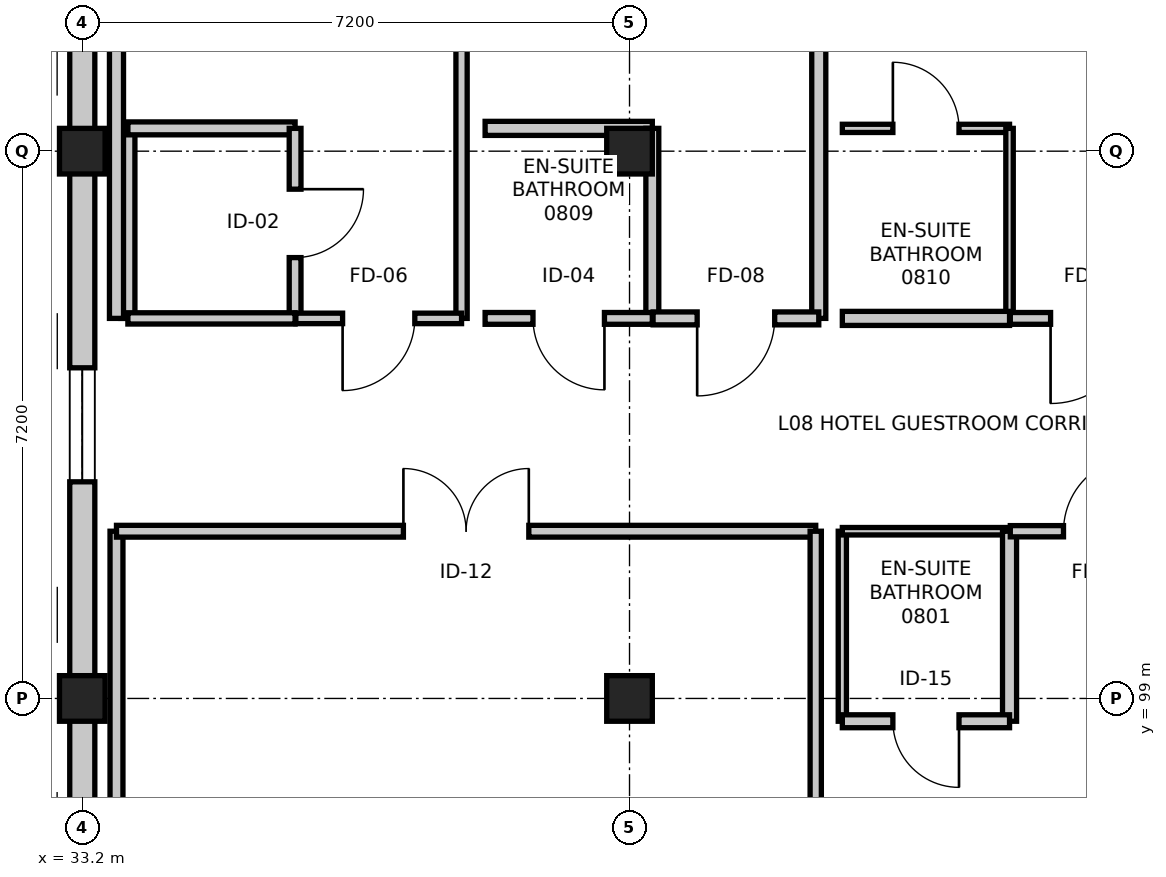
"""IFC4 building model, lengths in metres.
Left out: names, types, materials, properties, quantities, classifications, styles, units other than length and angle.
Written with IfcOpenShell. Run it as: python <this file> out.ifc"""

import sys

from ifc_helpers import new_model, si_unit, direction, frame, frame_2d, origin, origin_2d, place, context, subcontext, project, spatial, rectangle, extrude, element, fill, save


model = new_model("IFC4")
c1 = context("Model", 3, precision=1e-05, world=origin(), true_north=direction((0.0, 1.0)))
c2 = subcontext(c1, "Body", "Model", "MODEL_VIEW")
j1 = project(units=[si_unit("LENGTHUNIT", "METRE"), si_unit("PLANEANGLEUNIT", "RADIAN")], contexts=[c1])
p1 = place(None, origin())
s1 = spatial("IfcSite", under=j1, at=p1, CompositionType="ELEMENT")
p2 = place(p1, origin())
s2 = spatial("IfcBuilding", under=s1, at=p2, CompositionType="ELEMENT")
p3 = place(p2, frame((0.0, 0.0, 33.6)))
s3 = spatial("IfcBuildingStorey", under=s2, at=p3, CompositionType="ELEMENT", Elevation=33.6)
for number, where, z_axis, x_axis in (
    (1, (33.2, 99.0, 0.0), (0.0, 0.0, 1.0), (1.0, 0.0, 0.0)),
    (2, (33.2, 106.2, 0.0), (0.0, 0.0, 1.0), (1.0, 0.0, 0.0)),
    (3, (40.4, 99.0, 0.0), (0.0, 0.0, 1.0), (1.0, 0.0, 0.0)),
    (4, (40.4, 106.2, 0.0), (0.0, 0.0, 1.0), (1.0, 0.0, 0.0)),
):
    element("IfcColumn", number, at=place(p3, frame(where, z_axis=z_axis, x_axis=x_axis)), inside=s3, PredefinedType="COLUMN", context=c2, shape_type="SweptSolid", body=[
        extrude(rectangle(XDim=0.6, YDim=0.6, at=origin_2d()), origin(), (0.0, 0.0, 1.0), 3.6),
    ])
p4 = place(p3, frame((33.2, 91.8, 0.0), z_axis=(0.0, 0.0, 1.0), x_axis=(0.0, 1.0, 0.0)))
e5 = element("IfcWall", 5, at=p4, inside=s3, PredefinedType="STANDARD", context=c2, shape_type="SweptSolid", body=[
    extrude(rectangle(XDim=7.2, YDim=0.33, at=frame_2d((3.6, 0.0))), origin(), (0.0, 0.0, 1.0), 2.695),
])
p5 = place(p4, frame((2.85, 0.0, 0.75)))
e6 = element("IfcOpeningElement", 6, at=p5, cuts=e5, PredefinedType="OPENING", context=c2, shape_type="SweptSolid", body=[
    extrude(rectangle(XDim=1.5, YDim=1.5, at=frame_2d((0.75, 0.75))), frame((0.0, 0.175, 0.0), z_axis=(0.0, -1.0, 0.0), x_axis=(1.0, 0.0, 0.0)), (0.0, 0.0, 1.0), 0.35),
])
p6 = place(p3, frame((33.2, 99.0, 0.0), z_axis=(0.0, 0.0, 1.0), x_axis=(0.0, 1.0, 0.0)))
e7 = element("IfcWall", 7, at=p6, inside=s3, PredefinedType="STANDARD", context=c2, shape_type="SweptSolid", body=[
    extrude(rectangle(XDim=7.2, YDim=0.33, at=frame_2d((3.6, 0.0))), origin(), (0.0, 0.0, 1.0), 2.695),
])
p7 = place(p6, frame((2.85, 0.0, 0.75)))
e8 = element("IfcOpeningElement", 8, at=p7, cuts=e7, PredefinedType="OPENING", context=c2, shape_type="SweptSolid", body=[
    extrude(rectangle(XDim=1.5, YDim=1.5, at=frame_2d((0.75, 0.75))), frame((0.0, 0.175, 0.0), z_axis=(0.0, -1.0, 0.0), x_axis=(1.0, 0.0, 0.0)), (0.0, 0.0, 1.0), 0.35),
])
p8 = place(p3, frame((33.2, 106.2, 0.0), z_axis=(0.0, 0.0, 1.0), x_axis=(0.0, 1.0, 0.0)))
e9 = element("IfcWall", 9, at=p8, inside=s3, PredefinedType="STANDARD", context=c2, shape_type="SweptSolid", body=[
    extrude(rectangle(XDim=7.2, YDim=0.33, at=frame_2d((3.6, 0.0))), origin(), (0.0, 0.0, 1.0), 2.695),
])
p9 = place(p8, frame((2.85, 0.0, 0.75)))
e10 = element("IfcOpeningElement", 10, at=p9, cuts=e9, PredefinedType="OPENING", context=c2, shape_type="SweptSolid", body=[
    extrude(rectangle(XDim=1.5, YDim=1.5, at=frame_2d((0.75, 0.75))), frame((0.0, 0.175, 0.0), z_axis=(0.0, -1.0, 0.0), x_axis=(1.0, 0.0, 0.0)), (0.0, 0.0, 1.0), 0.35),
])
p10 = place(p3, frame((33.65, 91.96, 0.0), z_axis=(0.0, 0.0, 1.0), x_axis=(0.0, 1.0, 0.0)))
e11 = element("IfcWall", 11, at=p10, inside=s3, PredefinedType="PARTITIONING", context=c2, shape_type="SweptSolid", body=[
    extrude(rectangle(XDim=9.24, YDim=0.17, at=frame_2d((4.62, 0.0))), origin(), (0.0, 0.0, 1.0), 2.745),
])
p11 = place(p3, frame((33.65, 101.2, 0.0), z_axis=(0.0, 0.0, 1.0), x_axis=(1.0, 0.0, 0.0)))
e12 = element("IfcWall", 12, at=p11, inside=s3, PredefinedType="PARTITIONING", context=c2, shape_type="SweptSolid", body=[
    extrude(rectangle(XDim=9.2, YDim=0.155, at=frame_2d((4.6, 0.0))), origin(), (0.0, 0.0, 1.0), 2.695),
])
p12 = place(p11, frame((3.775, 0.0, 0.0)))
e13 = element("IfcOpeningElement", 13, at=p12, cuts=e12, PredefinedType="OPENING", context=c2, shape_type="SweptSolid", body=[
    extrude(rectangle(XDim=1.65, YDim=2.25, at=frame_2d((0.825, 1.125))), frame((0.0, 0.087, 0.0), z_axis=(0.0, -1.0, 0.0), x_axis=(1.0, 0.0, 0.0)), (0.0, 0.0, 1.0), 0.175),
])
p13 = place(p3, frame((42.85, 101.2, 0.0), z_axis=(0.0, 0.0, 1.0), x_axis=(0.0, -1.0, 0.0)))
e14 = element("IfcWall", 14, at=p13, inside=s3, PredefinedType="PARTITIONING", context=c2, shape_type="SweptSolid", body=[
    extrude(rectangle(XDim=9.24, YDim=0.148, at=frame_2d((4.62, 0.0))), origin(), (0.0, 0.0, 1.0), 2.745),
])
p14 = place(p3, frame((43.2, 98.7, 0.0), z_axis=(0.0, 0.0, 1.0), x_axis=(0.0, 1.0, 0.0)))
e15 = element("IfcWall", 15, at=p14, inside=s3, PredefinedType="PARTITIONING", context=c2, shape_type="SweptSolid", body=[
    extrude(rectangle(XDim=2.5, YDim=0.108, at=frame_2d((1.25, 0.0))), origin(), (0.0, 0.0, 1.0), 2.745),
])
p15 = place(p3, frame((43.2, 101.2, 0.0), z_axis=(0.0, 0.0, 1.0), x_axis=(1.0, 0.0, 0.0)))
e16 = element("IfcWall", 16, at=p15, inside=s3, PredefinedType="PARTITIONING", context=c2, shape_type="SweptSolid", body=[
    extrude(rectangle(XDim=2.2, YDim=0.098, at=frame_2d((1.1, 0.0))), origin(), (0.0, 0.0, 1.0), 3.36),
])
p16 = place(p3, frame((45.4, 101.2, 0.0), z_axis=(0.0, 0.0, 1.0), x_axis=(0.0, -1.0, 0.0)))
e17 = element("IfcWall", 17, at=p16, inside=s3, PredefinedType="PARTITIONING", context=c2, shape_type="SweptSolid", body=[
    extrude(rectangle(XDim=2.5, YDim=0.185, at=frame_2d((1.25, 0.0))), origin(), (0.0, 0.0, 1.0), 2.745),
])
p17 = place(p3, frame((45.4, 98.7, 0.0), z_axis=(0.0, 0.0, 1.0), x_axis=(-1.0, 0.0, 0.0)))
e18 = element("IfcWall", 18, at=p17, inside=s3, PredefinedType="PARTITIONING", context=c2, shape_type="SweptSolid", body=[
    extrude(rectangle(XDim=2.2, YDim=0.17, at=frame_2d((1.1, 0.0))), origin(), (0.0, 0.0, 1.0), 2.745),
])
p18 = place(p17, frame((0.665, 0.0, 0.0)))
e19 = element("IfcOpeningElement", 19, at=p18, cuts=e18, PredefinedType="OPENING", context=c2, shape_type="SweptSolid", body=[
    extrude(rectangle(XDim=0.87, YDim=2.07, at=frame_2d((0.435, 1.035))), frame((0.0, 0.095, 0.0), z_axis=(0.0, -1.0, 0.0), x_axis=(1.0, 0.0, 0.0)), (0.0, 0.0, 1.0), 0.19),
])
p19 = place(p3, frame((45.41, 101.2, 0.0), z_axis=(0.0, 0.0, 1.0), x_axis=(1.0, 0.0, 0.0)))
e20 = element("IfcWall", 20, at=p19, inside=s3, PredefinedType="PARTITIONING", context=c2, shape_type="SweptSolid", body=[
    extrude(rectangle(XDim=2.38, YDim=0.148, at=frame_2d((1.19, 0.0))), origin(), (0.0, 0.0, 1.0), 2.695),
])
p20 = place(p19, frame((0.7, 0.0, 0.0)))
e21 = element("IfcOpeningElement", 21, at=p20, cuts=e20, PredefinedType="OPENING", context=c2, shape_type="SweptSolid", body=[
    extrude(rectangle(XDim=0.98, YDim=2.15, at=frame_2d((0.49, 1.075))), frame((0.0, 0.084, 0.0), z_axis=(0.0, -1.0, 0.0), x_axis=(1.0, 0.0, 0.0)), (0.0, 0.0, 1.0), 0.168),
])
p21 = place(p3, frame((33.8, 104.0, 0.0), z_axis=(0.0, 0.0, 1.0), x_axis=(0.0, 1.0, 0.0)))
e22 = element("IfcWall", 22, at=p21, inside=s3, PredefinedType="PARTITIONING", context=c2, shape_type="SweptSolid", body=[
    extrude(rectangle(XDim=2.5, YDim=0.185, at=frame_2d((1.25, 0.0))), origin(), (0.0, 0.0, 1.0), 2.745),
])
p22 = place(p3, frame((33.8, 106.5, 0.0), z_axis=(0.0, 0.0, 1.0), x_axis=(1.0, 0.0, 0.0)))
e23 = element("IfcWall", 23, at=p22, inside=s3, PredefinedType="PARTITIONING", context=c2, shape_type="SweptSolid", body=[
    extrude(rectangle(XDim=2.2, YDim=0.17, at=frame_2d((1.1, 0.0))), origin(), (0.0, 0.0, 1.0), 2.745),
])
p23 = place(p3, frame((36.0, 106.5, 0.0), z_axis=(0.0, 0.0, 1.0), x_axis=(0.0, -1.0, 0.0)))
e24 = element("IfcWall", 24, at=p23, inside=s3, PredefinedType="PARTITIONING", context=c2, shape_type="SweptSolid", body=[
    extrude(rectangle(XDim=2.5, YDim=0.155, at=frame_2d((1.25, 0.0))), origin(), (0.0, 0.0, 1.0), 2.745),
])
p24 = place(p23, frame((0.8, 0.0, 0.0)))
e25 = element("IfcOpeningElement", 25, at=p24, cuts=e24, PredefinedType="OPENING", context=c2, shape_type="SweptSolid", body=[
    extrude(rectangle(XDim=0.9, YDim=2.08, at=frame_2d((0.45, 1.04))), frame((0.0, 0.087, 0.0), z_axis=(0.0, -1.0, 0.0), x_axis=(1.0, 0.0, 0.0)), (0.0, 0.0, 1.0), 0.175),
])
p25 = place(p3, frame((36.0, 104.0, 0.0), z_axis=(0.0, 0.0, 1.0), x_axis=(-1.0, 0.0, 0.0)))
e26 = element("IfcWall", 26, at=p25, inside=s3, PredefinedType="PARTITIONING", context=c2, shape_type="SweptSolid", body=[
    extrude(rectangle(XDim=2.2, YDim=0.148, at=frame_2d((1.1, 0.0))), origin(), (0.0, 0.0, 1.0), 3.36),
])
p26 = place(p3, frame((33.65, 104.0, 0.0), z_axis=(0.0, 0.0, 1.0), x_axis=(0.0, 1.0, 0.0)))
e27 = element("IfcWall", 27, at=p26, inside=s3, PredefinedType="PARTITIONING", context=c2, shape_type="SweptSolid", body=[
    extrude(rectangle(XDim=8.96, YDim=0.185, at=frame_2d((4.48, 0.0))), origin(), (0.0, 0.0, 1.0), 2.745),
])
p27 = place(p3, frame((38.19, 113.1, 0.0), z_axis=(0.0, 0.0, 1.0), x_axis=(0.0, -1.0, 0.0)))
e28 = element("IfcWall", 28, at=p27, inside=s3, PredefinedType="PARTITIONING", context=c2, shape_type="SweptSolid", body=[
    extrude(rectangle(XDim=9.1, YDim=0.148, at=frame_2d((4.55, 0.0))), origin(), (0.0, 0.0, 1.0), 2.745),
])
p28 = place(p3, frame((38.19, 104.0, 0.0), z_axis=(0.0, 0.0, 1.0), x_axis=(-1.0, 0.0, 0.0)))
e29 = element("IfcWall", 29, at=p28, inside=s3, PredefinedType="PARTITIONING", context=c2, shape_type="SweptSolid", body=[
    extrude(rectangle(XDim=2.18, YDim=0.138, at=frame_2d((1.09, 0.0))), origin(), (0.0, 0.0, 1.0), 3.36),
])
p29 = place(p28, frame((0.615, 0.0, 0.0)))
e30 = element("IfcOpeningElement", 30, at=p29, cuts=e29, PredefinedType="OPENING", context=c2, shape_type="SweptSolid", body=[
    extrude(rectangle(XDim=0.95, YDim=2.1, at=frame_2d((0.475, 1.05))), frame((0.0, 0.079, 0.0), z_axis=(0.0, -1.0, 0.0), x_axis=(1.0, 0.0, 0.0)), (0.0, 0.0, 1.0), 0.158),
])
p30 = place(p3, frame((38.5, 106.5, 0.0), z_axis=(0.0, 0.0, 1.0), x_axis=(1.0, 0.0, 0.0)))
e31 = element("IfcWall", 31, at=p30, inside=s3, PredefinedType="PARTITIONING", context=c2, shape_type="SweptSolid", body=[
    extrude(rectangle(XDim=2.2, YDim=0.185, at=frame_2d((1.1, 0.0))), origin(), (0.0, 0.0, 1.0), 2.695),
])
p31 = place(p3, frame((40.7, 106.5, 0.0), z_axis=(0.0, 0.0, 1.0), x_axis=(0.0, -1.0, 0.0)))
e32 = element("IfcWall", 32, at=p31, inside=s3, PredefinedType="PARTITIONING", context=c2, shape_type="SweptSolid", body=[
    extrude(rectangle(XDim=2.5, YDim=0.17, at=frame_2d((1.25, 0.0))), origin(), (0.0, 0.0, 1.0), 2.695),
])
p32 = place(p3, frame((40.7, 104.0, 0.0), z_axis=(0.0, 0.0, 1.0), x_axis=(-1.0, 0.0, 0.0)))
e33 = element("IfcWall", 33, at=p32, inside=s3, PredefinedType="PARTITIONING", context=c2, shape_type="SweptSolid", body=[
    extrude(rectangle(XDim=2.2, YDim=0.155, at=frame_2d((1.1, 0.0))), origin(), (0.0, 0.0, 1.0), 2.695),
])
p33 = place(p32, frame((0.63, 0.0, 0.0)))
e34 = element("IfcOpeningElement", 34, at=p33, cuts=e33, PredefinedType="OPENING", context=c2, shape_type="SweptSolid", body=[
    extrude(rectangle(XDim=0.94, YDim=2.12, at=frame_2d((0.47, 1.06))), frame((0.0, 0.087, 0.0), z_axis=(0.0, -1.0, 0.0), x_axis=(1.0, 0.0, 0.0)), (0.0, 0.0, 1.0), 0.175),
])
p34 = place(p3, frame((42.89, 113.337, 0.0), z_axis=(0.0, 0.0, 1.0), x_axis=(0.0, -1.0, 0.0)))
e35 = element("IfcWall", 35, at=p34, inside=s3, PredefinedType="PARTITIONING", context=c2, shape_type="SweptSolid", body=[
    extrude(rectangle(XDim=9.337, YDim=0.185, at=frame_2d((4.668, 0.0))), origin(), (0.0, 0.0, 1.0), 2.745),
])
p35 = place(p3, frame((42.89, 104.0, 0.0), z_axis=(0.0, 0.0, 1.0), x_axis=(-1.0, 0.0, 0.0)))
e36 = element("IfcWall", 36, at=p35, inside=s3, PredefinedType="PARTITIONING", context=c2, shape_type="SweptSolid", body=[
    extrude(rectangle(XDim=2.18, YDim=0.17, at=frame_2d((1.09, 0.0))), origin(), (0.0, 0.0, 1.0), 3.36),
])
p36 = place(p35, frame((0.58, 0.0, 0.0)))
e37 = element("IfcOpeningElement", 37, at=p36, cuts=e36, PredefinedType="OPENING", context=c2, shape_type="SweptSolid", body=[
    extrude(rectangle(XDim=1.02, YDim=2.15, at=frame_2d((0.51, 1.075))), frame((0.0, 0.095, 0.0), z_axis=(0.0, -1.0, 0.0), x_axis=(1.0, 0.0, 0.0)), (0.0, 0.0, 1.0), 0.19),
])
p37 = place(p3, frame((43.2, 106.5, 0.0), z_axis=(0.0, 0.0, 1.0), x_axis=(1.0, 0.0, 0.0)))
e38 = element("IfcWall", 38, at=p37, inside=s3, PredefinedType="PARTITIONING", context=c2, shape_type="SweptSolid", body=[
    extrude(rectangle(XDim=2.2, YDim=0.108, at=frame_2d((1.1, 0.0))), origin(), (0.0, 0.0, 1.0), 3.36),
])
p38 = place(p37, frame((0.665, 0.0, 0.0)))
e39 = element("IfcOpeningElement", 39, at=p38, cuts=e38, PredefinedType="OPENING", context=c2, shape_type="SweptSolid", body=[
    extrude(rectangle(XDim=0.87, YDim=2.07, at=frame_2d((0.435, 1.035))), frame((0.0, 0.064, 0.0), z_axis=(0.0, -1.0, 0.0), x_axis=(1.0, 0.0, 0.0)), (0.0, 0.0, 1.0), 0.128),
])
p39 = place(p3, frame((45.4, 106.5, 0.0), z_axis=(0.0, 0.0, 1.0), x_axis=(0.0, -1.0, 0.0)))
e40 = element("IfcWall", 40, at=p39, inside=s3, PredefinedType="PARTITIONING", context=c2, shape_type="SweptSolid", body=[
    extrude(rectangle(XDim=2.5, YDim=0.098, at=frame_2d((1.25, 0.0))), origin(), (0.0, 0.0, 1.0), 2.745),
])
p40 = place(p3, frame((45.4, 104.0, 0.0), z_axis=(0.0, 0.0, 1.0), x_axis=(-1.0, 0.0, 0.0)))
e41 = element("IfcWall", 41, at=p40, inside=s3, PredefinedType="PARTITIONING", context=c2, shape_type="SweptSolid", body=[
    extrude(rectangle(XDim=2.2, YDim=0.185, at=frame_2d((1.1, 0.0))), origin(), (0.0, 0.0, 1.0), 3.36),
])
p41 = place(p3, frame((47.59, 104.0, 0.0), z_axis=(0.0, 0.0, 1.0), x_axis=(-1.0, 0.0, 0.0)))
e42 = element("IfcWall", 42, at=p41, inside=s3, PredefinedType="PARTITIONING", context=c2, shape_type="SweptSolid", body=[
    extrude(rectangle(XDim=2.18, YDim=0.155, at=frame_2d((1.09, 0.0))), origin(), (0.0, 0.0, 1.0), 2.695),
])
p42 = place(p41, frame((0.53, 0.0, 0.0)))
e43 = element("IfcOpeningElement", 43, at=p42, cuts=e42, PredefinedType="OPENING", context=c2, shape_type="SweptSolid", body=[
    extrude(rectangle(XDim=1.12, YDim=2.2, at=frame_2d((0.56, 1.1))), frame((0.0, 0.087, 0.0), z_axis=(0.0, -1.0, 0.0), x_axis=(1.0, 0.0, 0.0)), (0.0, 0.0, 1.0), 0.175),
])
p43 = place(p7, origin())
e44 = element("IfcWindow", 44, at=p43, inside=s3, PartitioningType="SINGLE_PANEL", PredefinedType="WINDOW", context=c2, shape_type="SweptSolid", body=[
    extrude(rectangle(XDim=1.5, YDim=1.5, at=frame_2d((0.75, 0.75))), frame((0.0, 0.03, 0.0), z_axis=(0.0, -1.0, 0.0), x_axis=(1.0, 0.0, 0.0)), (0.0, 0.0, 1.0), 0.06),
])
fill(e8, e44)
p44 = place(p12, origin())
e45 = element("IfcDoor", 45, at=p44, inside=s3, OperationType="DOUBLE_DOOR_SINGLE_SWING", PredefinedType="DOOR", context=c2, shape_type="SweptSolid", body=[
    extrude(rectangle(XDim=1.65, YDim=2.25, at=frame_2d((0.825, 1.125))), frame((0.0, 0.025, 0.0), z_axis=(0.0, -1.0, 0.0), x_axis=(1.0, 0.0, 0.0)), (0.0, 0.0, 1.0), 0.05),
])
fill(e13, e45)
p45 = place(p18, origin())
e46 = element("IfcDoor", 46, at=p45, inside=s3, OperationType="SINGLE_SWING_LEFT", PredefinedType="DOOR", context=c2, shape_type="SweptSolid", body=[
    extrude(rectangle(XDim=0.87, YDim=2.07, at=frame_2d((0.435, 1.035))), frame((0.0, 0.025, 0.0), z_axis=(0.0, -1.0, 0.0), x_axis=(1.0, 0.0, 0.0)), (0.0, 0.0, 1.0), 0.05),
])
fill(e19, e46)
p46 = place(p20, origin())
e47 = element("IfcDoor", 47, at=p46, inside=s3, OperationType="SINGLE_SWING_RIGHT", PredefinedType="DOOR", context=c2, shape_type="SweptSolid", body=[
    extrude(rectangle(XDim=0.98, YDim=2.15, at=frame_2d((0.49, 1.075))), frame((0.0, 0.025, 0.0), z_axis=(0.0, -1.0, 0.0), x_axis=(1.0, 0.0, 0.0)), (0.0, 0.0, 1.0), 0.05),
])
fill(e21, e47)
p47 = place(p24, origin())
e48 = element("IfcDoor", 48, at=p47, inside=s3, OperationType="SINGLE_SWING_LEFT", PredefinedType="DOOR", context=c2, shape_type="SweptSolid", body=[
    extrude(rectangle(XDim=0.9, YDim=2.08, at=frame_2d((0.45, 1.04))), frame((0.0, 0.025, 0.0), z_axis=(0.0, -1.0, 0.0), x_axis=(1.0, 0.0, 0.0)), (0.0, 0.0, 1.0), 0.05),
])
fill(e25, e48)
p48 = place(p29, origin())
e49 = element("IfcDoor", 49, at=p48, inside=s3, OperationType="SINGLE_SWING_RIGHT", PredefinedType="DOOR", context=c2, shape_type="SweptSolid", body=[
    extrude(rectangle(XDim=0.95, YDim=2.1, at=frame_2d((0.475, 1.05))), frame((0.0, 0.025, 0.0), z_axis=(0.0, -1.0, 0.0), x_axis=(1.0, 0.0, 0.0)), (0.0, 0.0, 1.0), 0.05),
])
fill(e30, e49)
p49 = place(p33, origin())
e50 = element("IfcDoor", 50, at=p49, inside=s3, OperationType="SINGLE_SWING_LEFT", PredefinedType="DOOR", context=c2, shape_type="SweptSolid", body=[
    extrude(rectangle(XDim=0.94, YDim=2.12, at=frame_2d((0.47, 1.06))), frame((0.0, 0.025, 0.0), z_axis=(0.0, -1.0, 0.0), x_axis=(1.0, 0.0, 0.0)), (0.0, 0.0, 1.0), 0.05),
])
fill(e34, e50)
p50 = place(p36, origin())
e51 = element("IfcDoor", 51, at=p50, inside=s3, OperationType="SINGLE_SWING_RIGHT", PredefinedType="DOOR", context=c2, shape_type="SweptSolid", body=[
    extrude(rectangle(XDim=1.02, YDim=2.15, at=frame_2d((0.51, 1.075))), frame((0.0, 0.025, 0.0), z_axis=(0.0, -1.0, 0.0), x_axis=(1.0, 0.0, 0.0)), (0.0, 0.0, 1.0), 0.05),
])
fill(e37, e51)
p51 = place(p38, origin())
e52 = element("IfcDoor", 52, at=p51, inside=s3, OperationType="SINGLE_SWING_LEFT", PredefinedType="DOOR", context=c2, shape_type="SweptSolid", body=[
    extrude(rectangle(XDim=0.87, YDim=2.07, at=frame_2d((0.435, 1.035))), frame((0.0, 0.025, 0.0), z_axis=(0.0, -1.0, 0.0), x_axis=(1.0, 0.0, 0.0)), (0.0, 0.0, 1.0), 0.05),
])
fill(e39, e52)
p52 = place(p42, origin())
e53 = element("IfcDoor", 53, at=p52, inside=s3, OperationType="SINGLE_SWING_RIGHT", PredefinedType="DOOR", context=c2, shape_type="SweptSolid", body=[
    extrude(rectangle(XDim=1.12, YDim=2.2, at=frame_2d((0.56, 1.1))), frame((0.0, 0.025, 0.0), z_axis=(0.0, -1.0, 0.0), x_axis=(1.0, 0.0, 0.0)), (0.0, 0.0, 1.0), 0.05),
])
fill(e43, e53)
save(model, sys.argv[1])
